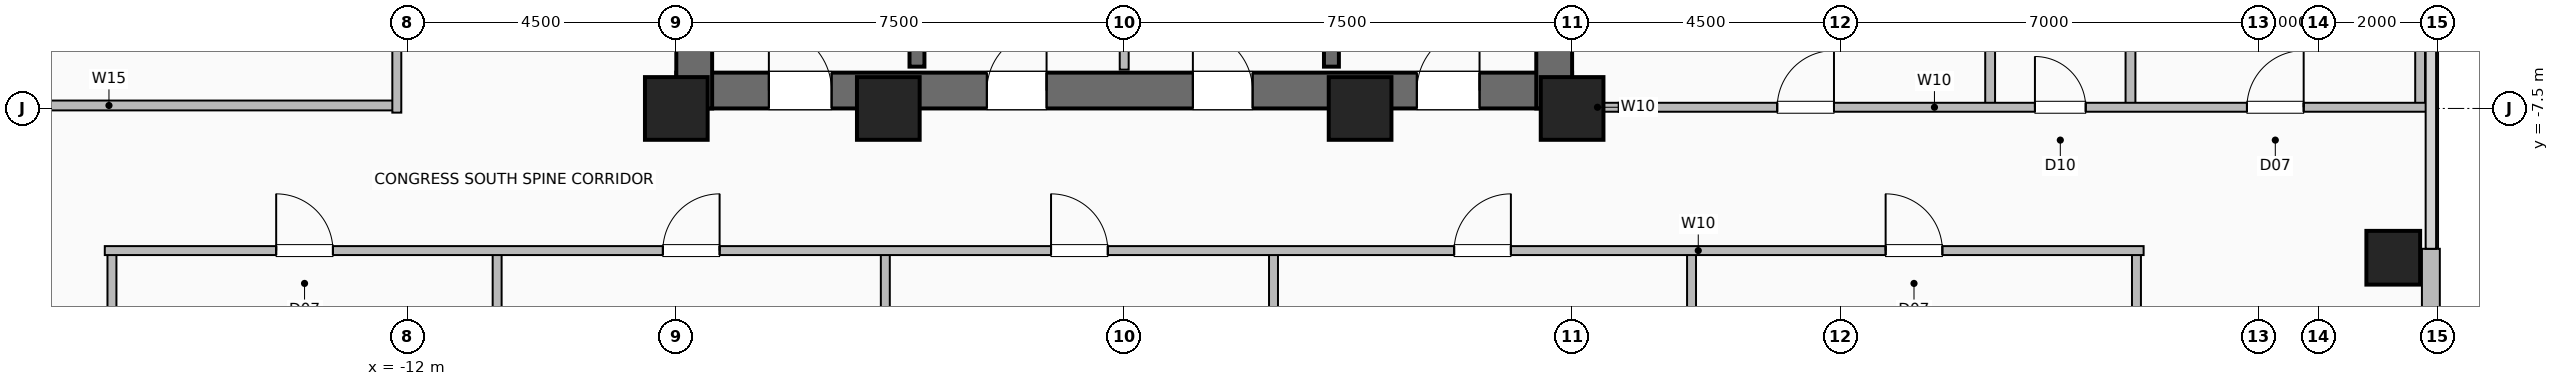
"""IFC4 building model, lengths in metres.
Left out: names, types, materials, properties, quantities, classifications, styles, units other than length and angle.
Written with IfcOpenShell. Run it as: python <this file> out.ifc"""

import sys

from ifc_helpers import new_model, si_unit, direction, frame, frame_2d, origin, origin_2d, place, context, subcontext, project, spatial, rectangle, hollow_rectangle, extrude, element, fill, save


model = new_model("IFC4")
c1 = context("Model", 3, precision=1e-05, world=origin(), true_north=direction((0.0, 1.0)))
c2 = subcontext(c1, "Body", "Model", "MODEL_VIEW")
j1 = project(units=[si_unit("LENGTHUNIT", "METRE"), si_unit("PLANEANGLEUNIT", "RADIAN")], contexts=[c1])
p1 = place(None, origin())
s1 = spatial("IfcSite", under=j1, at=p1, CompositionType="ELEMENT")
p2 = place(p1, origin())
s2 = spatial("IfcBuilding", under=s1, at=p2, CompositionType="ELEMENT")
p3 = place(p2, frame((0.0, 0.0, 112.0)))
s3 = spatial("IfcBuildingStorey", under=s2, at=p3, CompositionType="ELEMENT", Elevation=112.0)
for number, where, z_axis, x_axis in (
    (1, (-7.5, -7.5, 0.0), (0.0, 0.0, 1.0), (1.0, 0.0, 0.0)),
    (2, (-3.95, -7.5, 0.0), (0.0, 0.0, 1.0), (1.0, 0.0, 0.0)),
    (3, (3.95, -7.5, 0.0), (0.0, 0.0, 1.0), (1.0, 0.0, 0.0)),
    (4, (7.5, -7.5, 0.0), (0.0, 0.0, 1.0), (1.0, 0.0, 0.0)),
):
    element("IfcColumn", number, at=place(p3, frame(where, z_axis=z_axis, x_axis=x_axis)), inside=s3, PredefinedType="COLUMN", context=c2, shape_type="SweptSolid", body=[
        extrude(hollow_rectangle(XDim=1.05, YDim=1.05, WallThickness=0.05, at=origin_2d()), origin(), (0.0, 0.0, 1.0), 3.6),
    ])
p4 = place(p3, frame((21.25, -10.0, 0.0), z_axis=(0.0, 0.0, 1.0), x_axis=(1.0, 0.0, 0.0)))
e5 = element("IfcColumn", 5, at=p4, inside=s3, PredefinedType="COLUMN", context=c2, shape_type="SweptSolid", body=[
    extrude(hollow_rectangle(XDim=0.9, YDim=0.9, WallThickness=0.045, at=origin_2d()), origin(), (0.0, 0.0, 1.0), 3.6),
])
p5 = place(p3, frame((21.88, -16.15, 0.0), z_axis=(0.0, 0.0, 1.0), x_axis=(0.0, 1.0, 0.0)))
e6 = element("IfcWall", 6, at=p5, inside=s3, PredefinedType="SOLIDWALL", context=c2, shape_type="SweptSolid", body=[
    extrude(rectangle(XDim=6.3, YDim=0.3, at=frame_2d((3.15, 0.0))), origin(), (0.0, 0.0, 1.0), 3.36),
])
p6 = place(p3, frame((-7.5, -7.2, 0.0), z_axis=(0.0, 0.0, 1.0), x_axis=(1.0, 0.0, 0.0)))
e7 = element("IfcWall", 7, at=p6, inside=s3, PredefinedType="SHEAR", context=c2, shape_type="SweptSolid", body=[
    extrude(rectangle(XDim=15.0, YDim=0.6, at=frame_2d((7.5, 0.0))), origin(), (0.0, 0.0, 1.0), 3.36),
])
p7 = place(p6, frame((1.55, 0.0, 0.0)))
e8 = element("IfcOpeningElement", 8, at=p7, cuts=e7, PredefinedType="OPENING", context=c2, shape_type="SweptSolid", body=[
    extrude(rectangle(XDim=1.05, YDim=2.08, at=frame_2d((0.525, 1.04))), frame((0.0, 0.31, 0.0), z_axis=(0.0, -1.0, 0.0), x_axis=(1.0, 0.0, 0.0)), (0.0, 0.0, 1.0), 0.62),
])
p8 = place(p6, frame((12.4, 0.0, 0.0)))
e9 = element("IfcOpeningElement", 9, at=p8, cuts=e7, PredefinedType="OPENING", context=c2, shape_type="SweptSolid", body=[
    extrude(rectangle(XDim=1.05, YDim=2.08, at=frame_2d((0.525, 1.04))), frame((0.0, 0.31, 0.0), z_axis=(0.0, -1.0, 0.0), x_axis=(1.0, 0.0, 0.0)), (0.0, 0.0, 1.0), 0.62),
])
p9 = place(p6, frame((5.2, 0.0, 0.0)))
e10 = element("IfcOpeningElement", 10, at=p9, cuts=e7, PredefinedType="OPENING", context=c2, shape_type="SweptSolid", body=[
    extrude(rectangle(XDim=1.0, YDim=2.08, at=frame_2d((0.5, 1.04))), frame((0.0, 0.31, 0.0), z_axis=(0.0, -1.0, 0.0), x_axis=(1.0, 0.0, 0.0)), (0.0, 0.0, 1.0), 0.62),
])
p10 = place(p6, frame((8.65, 0.0, 0.0)))
e11 = element("IfcOpeningElement", 11, at=p10, cuts=e7, PredefinedType="OPENING", context=c2, shape_type="SweptSolid", body=[
    extrude(rectangle(XDim=1.0, YDim=2.08, at=frame_2d((0.5, 1.04))), frame((0.0, 0.31, 0.0), z_axis=(0.0, -1.0, 0.0), x_axis=(1.0, 0.0, 0.0)), (0.0, 0.0, 1.0), 0.62),
])
p11 = place(p3, frame((-7.2, -7.5, 0.0), z_axis=(0.0, 0.0, 1.0), x_axis=(0.0, 1.0, 0.0)))
e12 = element("IfcWall", 12, at=p11, inside=s3, PredefinedType="SHEAR", context=c2, shape_type="SweptSolid", body=[
    extrude(rectangle(XDim=15.0, YDim=0.6, at=frame_2d((7.5, 0.0))), origin(), (0.0, 0.0, 1.0), 3.36),
])
p12 = place(p11, frame((9.5, 0.0, 0.0)))
e13 = element("IfcOpeningElement", 13, at=p12, cuts=e12, PredefinedType="OPENING", context=c2, shape_type="SweptSolid", body=[
    extrude(rectangle(XDim=1.0, YDim=2.08, at=frame_2d((0.5, 1.04))), frame((0.0, 0.31, 0.0), z_axis=(0.0, -1.0, 0.0), x_axis=(1.0, 0.0, 0.0)), (0.0, 0.0, 1.0), 0.62),
])
p13 = place(p3, frame((7.2, -7.5, 0.0), z_axis=(0.0, 0.0, 1.0), x_axis=(0.0, 1.0, 0.0)))
e14 = element("IfcWall", 14, at=p13, inside=s3, PredefinedType="SHEAR", context=c2, shape_type="SweptSolid", body=[
    extrude(rectangle(XDim=15.0, YDim=0.6, at=frame_2d((7.5, 0.0))), origin(), (0.0, 0.0, 1.0), 3.36),
])
for number, where, z_axis, x_axis in (
    (15, (-3.47, -6.8, 0.0), (0.0, 0.0, 1.0), (0.0, 1.0, 0.0)),
    (16, (3.47, -6.8, 0.0), (0.0, 0.0, 1.0), (0.0, 1.0, 0.0)),
):
    element("IfcWall", number, at=place(p3, frame(where, z_axis=z_axis, x_axis=x_axis)), inside=s3, PredefinedType="SHEAR", context=c2, shape_type="SweptSolid", body=[
        extrude(rectangle(XDim=7.72, YDim=0.25, at=frame_2d((3.86, 0.0))), origin(), (0.0, 0.0, 1.0), 3.36),
    ])
p14 = place(p3, frame((0.0, -6.85, 0.0), z_axis=(0.0, 0.0, 1.0), x_axis=(0.0, 1.0, 0.0)))
e17 = element("IfcWall", 17, at=p14, inside=s3, PredefinedType="PARTITIONING", context=c2, shape_type="SweptSolid", body=[
    extrude(rectangle(XDim=4.42, YDim=0.15, at=frame_2d((2.21, 0.0))), origin(), (0.0, 0.0, 1.0), 3.36),
])
for number, where, z_axis, x_axis in (
    (18, (-16.95, -21.82, 0.0), (0.0, 0.0, 1.0), (0.0, 1.0, 0.0)),
    (19, (-10.5, -21.82, 0.0), (0.0, 0.0, 1.0), (0.0, 1.0, 0.0)),
    (20, (-4.0, -21.82, 0.0), (0.0, 0.0, 1.0), (0.0, 1.0, 0.0)),
    (21, (2.5, -21.82, 0.0), (0.0, 0.0, 1.0), (0.0, 1.0, 0.0)),
    (22, (9.5, -21.82, 0.0), (0.0, 0.0, 1.0), (0.0, 1.0, 0.0)),
    (23, (16.95, -21.82, 0.0), (0.0, 0.0, 1.0), (0.0, 1.0, 0.0)),
):
    element("IfcWall", number, at=place(p3, frame(where, z_axis=z_axis, x_axis=x_axis)), inside=s3, PredefinedType="PARTITIONING", context=c2, shape_type="SweptSolid", body=[
        extrude(rectangle(XDim=11.94, YDim=0.15, at=frame_2d((5.97, 0.0))), origin(), (0.0, 0.0, 1.0), 3.36),
    ])
p15 = place(p3, frame((-17.07, -9.88, 0.0), z_axis=(0.0, 0.0, 1.0), x_axis=(1.0, 0.0, 0.0)))
e24 = element("IfcWall", 24, at=p15, inside=s3, PredefinedType="PARTITIONING", context=c2, shape_type="SweptSolid", body=[
    extrude(rectangle(XDim=34.14, YDim=0.15, at=frame_2d((17.07, 0.0))), origin(), (0.0, 0.0, 1.0), 3.36),
])
p16 = place(p15, frame((2.87, 0.0, 0.0)))
e25 = element("IfcOpeningElement", 25, at=p16, cuts=e24, PredefinedType="OPENING", context=c2, shape_type="SweptSolid", body=[
    extrude(rectangle(XDim=0.95, YDim=2.06, at=frame_2d((0.475, 1.03))), frame((0.0, 0.085, 0.0), z_axis=(0.0, -1.0, 0.0), x_axis=(1.0, 0.0, 0.0)), (0.0, 0.0, 1.0), 0.17),
])
p17 = place(p15, frame((9.345, 0.0, 0.0)))
e26 = element("IfcOpeningElement", 26, at=p17, cuts=e24, PredefinedType="OPENING", context=c2, shape_type="SweptSolid", body=[
    extrude(rectangle(XDim=0.95, YDim=2.06, at=frame_2d((0.475, 1.03))), frame((0.0, 0.085, 0.0), z_axis=(0.0, -1.0, 0.0), x_axis=(1.0, 0.0, 0.0)), (0.0, 0.0, 1.0), 0.17),
])
p18 = place(p15, frame((15.845, 0.0, 0.0)))
e27 = element("IfcOpeningElement", 27, at=p18, cuts=e24, PredefinedType="OPENING", context=c2, shape_type="SweptSolid", body=[
    extrude(rectangle(XDim=0.95, YDim=2.06, at=frame_2d((0.475, 1.03))), frame((0.0, 0.085, 0.0), z_axis=(0.0, -1.0, 0.0), x_axis=(1.0, 0.0, 0.0)), (0.0, 0.0, 1.0), 0.17),
])
p19 = place(p15, frame((22.595, 0.0, 0.0)))
e28 = element("IfcOpeningElement", 28, at=p19, cuts=e24, PredefinedType="OPENING", context=c2, shape_type="SweptSolid", body=[
    extrude(rectangle(XDim=0.95, YDim=2.06, at=frame_2d((0.475, 1.03))), frame((0.0, 0.085, 0.0), z_axis=(0.0, -1.0, 0.0), x_axis=(1.0, 0.0, 0.0)), (0.0, 0.0, 1.0), 0.17),
])
p20 = place(p15, frame((29.82, 0.0, 0.0)))
e29 = element("IfcOpeningElement", 29, at=p20, cuts=e24, PredefinedType="OPENING", context=c2, shape_type="SweptSolid", body=[
    extrude(rectangle(XDim=0.95, YDim=2.06, at=frame_2d((0.475, 1.03))), frame((0.0, 0.085, 0.0), z_axis=(0.0, -1.0, 0.0), x_axis=(1.0, 0.0, 0.0)), (0.0, 0.0, 1.0), 0.17),
])
p21 = place(p3, frame((-21.82, -7.45, 0.0), z_axis=(0.0, 0.0, 1.0), x_axis=(1.0, 0.0, 0.0)))
e30 = element("IfcWall", 30, at=p21, inside=s3, PredefinedType="PLUMBINGWALL", context=c2, shape_type="SweptSolid", body=[
    extrude(rectangle(XDim=9.64, YDim=0.165, at=frame_2d((4.82, 0.0))), origin(), (0.0, 0.0, 1.0), 3.36),
])
p22 = place(p3, frame((-12.18, -7.57, 0.0), z_axis=(0.0, 0.0, 1.0), x_axis=(0.0, 1.0, 0.0)))
e31 = element("IfcWall", 31, at=p22, inside=s3, PredefinedType="PARTITIONING", context=c2, shape_type="SweptSolid", body=[
    extrude(rectangle(XDim=15.14, YDim=0.15, at=frame_2d((7.57, 0.0))), origin(), (0.0, 0.0, 1.0), 3.36),
])
p23 = place(p22, frame((7.095, 0.0, 0.0)))
e32 = element("IfcOpeningElement", 32, at=p23, cuts=e31, PredefinedType="OPENING", context=c2, shape_type="SweptSolid", body=[
    extrude(rectangle(XDim=0.95, YDim=2.06, at=frame_2d((0.475, 1.03))), frame((0.0, 0.085, 0.0), z_axis=(0.0, -1.0, 0.0), x_axis=(1.0, 0.0, 0.0)), (0.0, 0.0, 1.0), 0.17),
])
p24 = place(p3, frame((7.45, -7.48, 0.0), z_axis=(0.0, 0.0, 1.0), x_axis=(1.0, 0.0, 0.0)))
e33 = element("IfcWall", 33, at=p24, inside=s3, PredefinedType="PARTITIONING", context=c2, shape_type="SweptSolid", body=[
    extrude(rectangle(XDim=0.95, YDim=0.15, at=frame_2d((0.475, 0.0))), origin(), (0.0, 0.0, 1.0), 3.36),
])
for number, where, z_axis, x_axis in (
    (34, (16.85, -7.48, 0.0), (0.0, 0.0, 1.0), (0.0, 1.0, 0.0)),
    (35, (14.5, -7.48, 0.0), (0.0, 0.0, 1.0), (0.0, 1.0, 0.0)),
    (36, (21.7, -7.48, 0.0), (0.0, 0.0, 1.0), (0.0, 1.0, 0.0)),
):
    element("IfcWall", number, at=place(p3, frame(where, z_axis=z_axis, x_axis=x_axis)), inside=s3, PredefinedType="PLUMBINGWALL", context=c2, shape_type="SweptSolid", body=[
        extrude(rectangle(XDim=14.88, YDim=0.165, at=frame_2d((7.44, 0.0))), origin(), (0.0, 0.0, 1.0), 3.36),
    ])
p25 = place(p3, frame((8.28, -7.48, 0.0), z_axis=(0.0, 0.0, 1.0), x_axis=(1.0, 0.0, 0.0)))
e37 = element("IfcWall", 37, at=p25, inside=s3, PredefinedType="PARTITIONING", context=c2, shape_type="SweptSolid", body=[
    extrude(rectangle(XDim=13.54, YDim=0.15, at=frame_2d((6.77, 0.0))), origin(), (0.0, 0.0, 1.0), 3.36),
])
p26 = place(p25, frame((2.655, 0.0, 0.0)))
e38 = element("IfcOpeningElement", 38, at=p26, cuts=e37, PredefinedType="OPENING", context=c2, shape_type="SweptSolid", body=[
    extrude(rectangle(XDim=0.95, YDim=2.06, at=frame_2d((0.475, 1.03))), frame((0.0, 0.085, 0.0), z_axis=(0.0, -1.0, 0.0), x_axis=(1.0, 0.0, 0.0)), (0.0, 0.0, 1.0), 0.17),
])
p27 = place(p25, frame((6.97, 0.0, 0.0)))
e39 = element("IfcOpeningElement", 39, at=p27, cuts=e37, PredefinedType="OPENING", context=c2, shape_type="SweptSolid", body=[
    extrude(rectangle(XDim=0.85, YDim=2.05, at=frame_2d((0.425, 1.025))), frame((0.0, 0.085, 0.0), z_axis=(0.0, -1.0, 0.0), x_axis=(1.0, 0.0, 0.0)), (0.0, 0.0, 1.0), 0.17),
])
p28 = place(p25, frame((10.52, 0.0, 0.0)))
e40 = element("IfcOpeningElement", 40, at=p28, cuts=e37, PredefinedType="OPENING", context=c2, shape_type="SweptSolid", body=[
    extrude(rectangle(XDim=0.95, YDim=2.06, at=frame_2d((0.475, 1.03))), frame((0.0, 0.085, 0.0), z_axis=(0.0, -1.0, 0.0), x_axis=(1.0, 0.0, 0.0)), (0.0, 0.0, 1.0), 0.17),
])
p29 = place(p7, origin())
e41 = element("IfcDoor", 41, at=p29, inside=s3, OperationType="SINGLE_SWING_LEFT", PredefinedType="DOOR", context=c2, shape_type="SweptSolid", body=[
    extrude(rectangle(XDim=1.05, YDim=2.08, at=frame_2d((0.525, 1.04))), frame((0.0, 0.025, 0.0), z_axis=(0.0, -1.0, 0.0), x_axis=(1.0, 0.0, 0.0)), (0.0, 0.0, 1.0), 0.05),
])
fill(e8, e41)
p30 = place(p8, origin())
e42 = element("IfcDoor", 42, at=p30, inside=s3, OperationType="SINGLE_SWING_RIGHT", PredefinedType="DOOR", context=c2, shape_type="SweptSolid", body=[
    extrude(rectangle(XDim=1.05, YDim=2.08, at=frame_2d((0.525, 1.04))), frame((0.0, 0.025, 0.0), z_axis=(0.0, -1.0, 0.0), x_axis=(1.0, 0.0, 0.0)), (0.0, 0.0, 1.0), 0.05),
])
fill(e9, e42)
p31 = place(p9, origin())
e43 = element("IfcDoor", 43, at=p31, inside=s3, OperationType="SINGLE_SWING_RIGHT", PredefinedType="DOOR", context=c2, shape_type="SweptSolid", body=[
    extrude(rectangle(XDim=1.0, YDim=2.08, at=frame_2d((0.5, 1.04))), frame((0.0, 0.025, 0.0), z_axis=(0.0, -1.0, 0.0), x_axis=(1.0, 0.0, 0.0)), (0.0, 0.0, 1.0), 0.05),
])
fill(e10, e43)
p32 = place(p10, origin())
e44 = element("IfcDoor", 44, at=p32, inside=s3, OperationType="SINGLE_SWING_LEFT", PredefinedType="DOOR", context=c2, shape_type="SweptSolid", body=[
    extrude(rectangle(XDim=1.0, YDim=2.08, at=frame_2d((0.5, 1.04))), frame((0.0, 0.025, 0.0), z_axis=(0.0, -1.0, 0.0), x_axis=(1.0, 0.0, 0.0)), (0.0, 0.0, 1.0), 0.05),
])
fill(e11, e44)
p33 = place(p16, origin())
e45 = element("IfcDoor", 45, at=p33, inside=s3, OperationType="SINGLE_SWING_LEFT", PredefinedType="DOOR", context=c2, shape_type="SweptSolid", body=[
    extrude(rectangle(XDim=0.95, YDim=2.06, at=frame_2d((0.475, 1.03))), frame((0.0, 0.025, 0.0), z_axis=(0.0, -1.0, 0.0), x_axis=(1.0, 0.0, 0.0)), (0.0, 0.0, 1.0), 0.05),
])
fill(e25, e45)
p34 = place(p17, origin())
e46 = element("IfcDoor", 46, at=p34, inside=s3, OperationType="SINGLE_SWING_RIGHT", PredefinedType="DOOR", context=c2, shape_type="SweptSolid", body=[
    extrude(rectangle(XDim=0.95, YDim=2.06, at=frame_2d((0.475, 1.03))), frame((0.0, 0.025, 0.0), z_axis=(0.0, -1.0, 0.0), x_axis=(1.0, 0.0, 0.0)), (0.0, 0.0, 1.0), 0.05),
])
fill(e26, e46)
p35 = place(p18, origin())
e47 = element("IfcDoor", 47, at=p35, inside=s3, OperationType="SINGLE_SWING_LEFT", PredefinedType="DOOR", context=c2, shape_type="SweptSolid", body=[
    extrude(rectangle(XDim=0.95, YDim=2.06, at=frame_2d((0.475, 1.03))), frame((0.0, 0.025, 0.0), z_axis=(0.0, -1.0, 0.0), x_axis=(1.0, 0.0, 0.0)), (0.0, 0.0, 1.0), 0.05),
])
fill(e27, e47)
p36 = place(p19, origin())
e48 = element("IfcDoor", 48, at=p36, inside=s3, OperationType="SINGLE_SWING_RIGHT", PredefinedType="DOOR", context=c2, shape_type="SweptSolid", body=[
    extrude(rectangle(XDim=0.95, YDim=2.06, at=frame_2d((0.475, 1.03))), frame((0.0, 0.025, 0.0), z_axis=(0.0, -1.0, 0.0), x_axis=(1.0, 0.0, 0.0)), (0.0, 0.0, 1.0), 0.05),
])
fill(e28, e48)
p37 = place(p20, origin())
e49 = element("IfcDoor", 49, at=p37, inside=s3, OperationType="SINGLE_SWING_LEFT", PredefinedType="DOOR", context=c2, shape_type="SweptSolid", body=[
    extrude(rectangle(XDim=0.95, YDim=2.06, at=frame_2d((0.475, 1.03))), frame((0.0, 0.025, 0.0), z_axis=(0.0, -1.0, 0.0), x_axis=(1.0, 0.0, 0.0)), (0.0, 0.0, 1.0), 0.05),
])
fill(e29, e49)
p38 = place(p26, origin())
e50 = element("IfcDoor", 50, at=p38, inside=s3, OperationType="SINGLE_SWING_RIGHT", PredefinedType="DOOR", context=c2, shape_type="SweptSolid", body=[
    extrude(rectangle(XDim=0.95, YDim=2.06, at=frame_2d((0.475, 1.03))), frame((0.0, 0.025, 0.0), z_axis=(0.0, -1.0, 0.0), x_axis=(1.0, 0.0, 0.0)), (0.0, 0.0, 1.0), 0.05),
])
fill(e38, e50)
p39 = place(p27, origin())
e51 = element("IfcDoor", 51, at=p39, inside=s3, OperationType="SINGLE_SWING_LEFT", PredefinedType="DOOR", context=c2, shape_type="SweptSolid", body=[
    extrude(rectangle(XDim=0.85, YDim=2.05, at=frame_2d((0.425, 1.025))), frame((0.0, 0.025, 0.0), z_axis=(0.0, -1.0, 0.0), x_axis=(1.0, 0.0, 0.0)), (0.0, 0.0, 1.0), 0.05),
])
fill(e39, e51)
p40 = place(p28, origin())
e52 = element("IfcDoor", 52, at=p40, inside=s3, OperationType="SINGLE_SWING_RIGHT", PredefinedType="DOOR", context=c2, shape_type="SweptSolid", body=[
    extrude(rectangle(XDim=0.95, YDim=2.06, at=frame_2d((0.475, 1.03))), frame((0.0, 0.025, 0.0), z_axis=(0.0, -1.0, 0.0), x_axis=(1.0, 0.0, 0.0)), (0.0, 0.0, 1.0), 0.05),
])
fill(e40, e52)
save(model, sys.argv[1])
